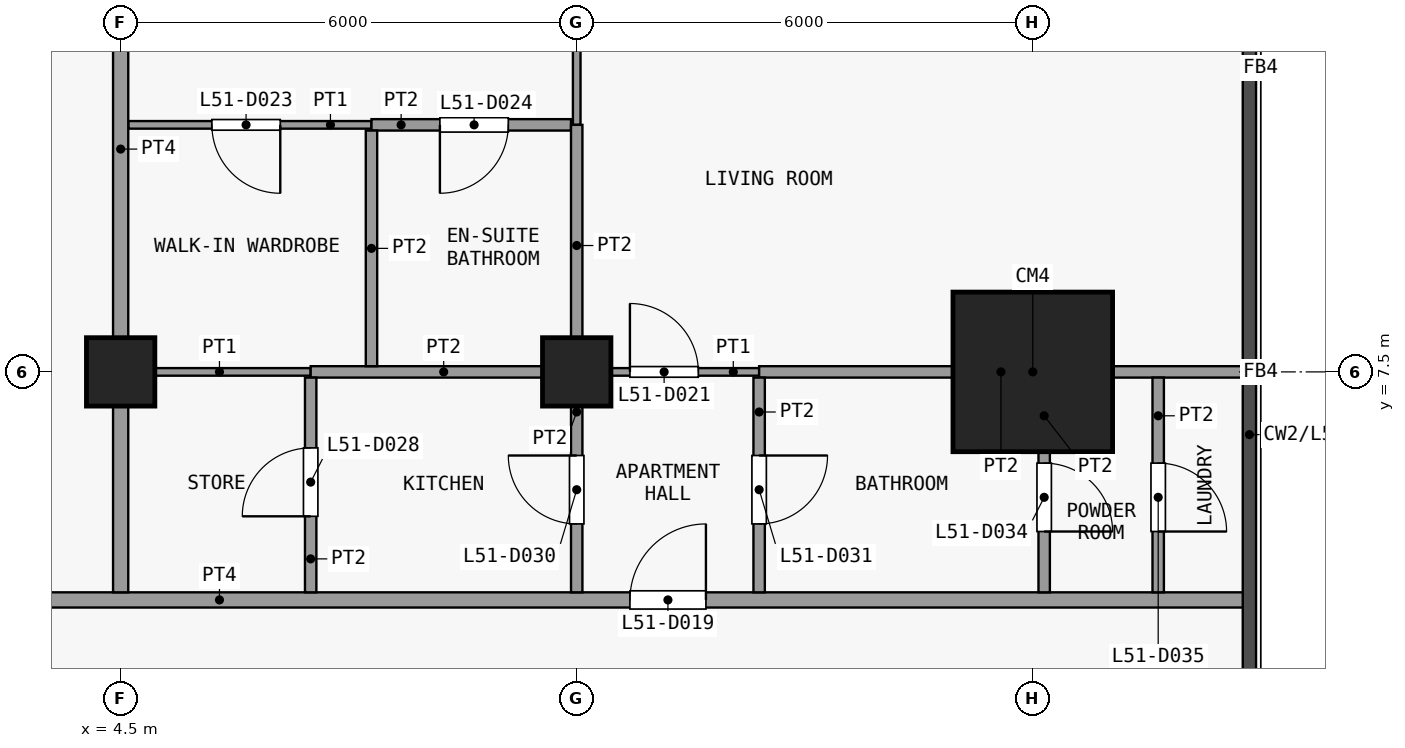
"""IFC4 building model, lengths in metres.
Left out: names, types, materials, properties, quantities, classifications, styles, units other than length and angle.
Written with IfcOpenShell. Run it as: python <this file> out.ifc"""

import sys

from ifc_helpers import new_model, si_unit, direction, frame, frame_2d, origin, origin_2d, place, context, subcontext, project, spatial, rectangle, extrude, element, fill, save


model = new_model("IFC4")
c1 = context("Model", 3, precision=1e-05, world=origin(), true_north=direction((0.0, 1.0)))
c2 = subcontext(c1, "Body", "Model", "MODEL_VIEW")
j1 = project(units=[si_unit("LENGTHUNIT", "METRE"), si_unit("PLANEANGLEUNIT", "RADIAN")], contexts=[c1])
p1 = place(None, origin())
s1 = spatial("IfcSite", under=j1, at=p1, CompositionType="ELEMENT")
p2 = place(p1, origin())
s2 = spatial("IfcBuilding", under=s1, at=p2, CompositionType="ELEMENT")
p3 = place(p2, frame((0.0, 0.0, 205.1)))
s3 = spatial("IfcBuildingStorey", under=s2, at=p3, CompositionType="ELEMENT", Elevation=205.1)
for number, where, z_axis, x_axis in (
    (1, (4.5, 7.5, 0.0), (0.0, 0.0, 1.0), (1.0, 0.0, 0.0)),
    (2, (10.5, 7.5, 0.0), (0.0, 0.0, 1.0), (1.0, 0.0, 0.0)),
):
    element("IfcColumn", number, at=place(p3, frame(where, z_axis=z_axis, x_axis=x_axis)), inside=s3, PredefinedType="COLUMN", context=c2, shape_type="SweptSolid", body=[
        extrude(rectangle(XDim=0.9, YDim=0.9, at=origin_2d()), origin(), (0.0, 0.0, 1.0), 3.6),
    ])
p4 = place(p3, frame((16.5, 7.5, 0.0), z_axis=(0.0, 0.0, 1.0), x_axis=(1.0, 0.0, 0.0)))
e3 = element("IfcColumn", 3, at=p4, inside=s3, PredefinedType="COLUMN", context=c2, shape_type="SweptSolid", body=[
    extrude(rectangle(XDim=2.1, YDim=2.1, at=origin_2d()), origin(), (0.0, 0.0, 1.0), 3.6),
])
p5 = place(p3, frame((-19.35, 4.5, 0.0), z_axis=(0.0, 0.0, 1.0), x_axis=(1.0, 0.0, 0.0)))
e4 = element("IfcWall", 4, at=p5, inside=s3, PredefinedType="PARTITIONING", context=c2, shape_type="SweptSolid", body=[
    extrude(rectangle(XDim=38.7, YDim=0.2, at=frame_2d((19.35, 0.0))), origin(), (0.0, 0.0, 1.0), 3.3),
])
p6 = place(p5, frame((4.55, 0.0, 0.0)))
e5 = element("IfcOpeningElement", 5, at=p6, cuts=e4, PredefinedType="OPENING", context=c2, shape_type="SweptSolid", body=[
    extrude(rectangle(XDim=1.0, YDim=2.1, at=frame_2d((0.5, 1.05))), frame((0.0, 0.11, 0.0), z_axis=(0.0, -1.0, 0.0), x_axis=(1.0, 0.0, 0.0)), (0.0, 0.0, 1.0), 0.22),
])
p7 = place(p5, frame((11.35, 0.0, 0.0)))
e6 = element("IfcOpeningElement", 6, at=p7, cuts=e4, PredefinedType="OPENING", context=c2, shape_type="SweptSolid", body=[
    extrude(rectangle(XDim=0.9, YDim=2.1, at=frame_2d((0.45, 1.05))), frame((0.0, 0.11, 0.0), z_axis=(0.0, -1.0, 0.0), x_axis=(1.0, 0.0, 0.0)), (0.0, 0.0, 1.0), 0.22),
])
p8 = place(p5, frame((18.85, 0.0, 0.0)))
e7 = element("IfcOpeningElement", 7, at=p8, cuts=e4, PredefinedType="OPENING", context=c2, shape_type="SweptSolid", body=[
    extrude(rectangle(XDim=0.9, YDim=2.1, at=frame_2d((0.45, 1.05))), frame((0.0, 0.11, 0.0), z_axis=(0.0, -1.0, 0.0), x_axis=(1.0, 0.0, 0.0)), (0.0, 0.0, 1.0), 0.22),
])
p9 = place(p5, frame((30.55, 0.0, 0.0)))
e8 = element("IfcOpeningElement", 8, at=p9, cuts=e4, PredefinedType="OPENING", context=c2, shape_type="SweptSolid", body=[
    extrude(rectangle(XDim=1.0, YDim=2.1, at=frame_2d((0.5, 1.05))), frame((0.0, 0.11, 0.0), z_axis=(0.0, -1.0, 0.0), x_axis=(1.0, 0.0, 0.0)), (0.0, 0.0, 1.0), 0.22),
])
p10 = place(p3, frame((4.6, 7.5, 0.0), z_axis=(0.0, 0.0, 1.0), x_axis=(1.0, 0.0, 0.0)))
e9 = element("IfcWall", 9, at=p10, inside=s3, PredefinedType="PARTITIONING", context=c2, shape_type="SweptSolid", body=[
    extrude(rectangle(XDim=2.4, YDim=0.1, at=frame_2d((1.2, 0.0))), origin(), (0.0, 0.0, 1.0), 3.3),
])
p11 = place(p3, frame((10.5, 7.5, 0.0), z_axis=(0.0, 0.0, 1.0), x_axis=(1.0, 0.0, 0.0)))
e10 = element("IfcWall", 10, at=p11, inside=s3, PredefinedType="PARTITIONING", context=c2, shape_type="SweptSolid", body=[
    extrude(rectangle(XDim=2.4, YDim=0.1, at=frame_2d((1.2, 0.0))), origin(), (0.0, 0.0, 1.0), 3.3),
])
p12 = place(p11, frame((0.7, 0.0, 0.0)))
e11 = element("IfcOpeningElement", 11, at=p12, cuts=e10, PredefinedType="OPENING", context=c2, shape_type="SweptSolid", body=[
    extrude(rectangle(XDim=0.9, YDim=2.1, at=frame_2d((0.45, 1.05))), frame((0.0, 0.06, 0.0), z_axis=(0.0, -1.0, 0.0), x_axis=(1.0, 0.0, 0.0)), (0.0, 0.0, 1.0), 0.12),
])
p13 = place(p3, frame((7.0, 7.5, 0.0), z_axis=(0.0, 0.0, 1.0), x_axis=(1.0, 0.0, 0.0)))
e12 = element("IfcWall", 12, at=p13, inside=s3, PredefinedType="PARTITIONING", context=c2, shape_type="SweptSolid", body=[
    extrude(rectangle(XDim=3.5, YDim=0.15, at=frame_2d((1.75, 0.0))), origin(), (0.0, 0.0, 1.0), 3.3),
])
p14 = place(p3, frame((12.9, 7.5, 0.0), z_axis=(0.0, 0.0, 1.0), x_axis=(1.0, 0.0, 0.0)))
e13 = element("IfcWall", 13, at=p14, inside=s3, PredefinedType="PARTITIONING", context=c2, shape_type="SweptSolid", body=[
    extrude(rectangle(XDim=6.363, YDim=0.15, at=frame_2d((3.181, 0.0))), origin(), (0.0, 0.0, 1.0), 3.3),
])
p15 = place(p3, frame((4.6, 10.75, 0.0), z_axis=(0.0, 0.0, 1.0), x_axis=(1.0, 0.0, 0.0)))
e14 = element("IfcWall", 14, at=p15, inside=s3, PredefinedType="PARTITIONING", context=c2, shape_type="SweptSolid", body=[
    extrude(rectangle(XDim=3.2, YDim=0.1, at=frame_2d((1.6, 0.0))), origin(), (0.0, 0.0, 1.0), 3.3),
])
p16 = place(p15, frame((1.1, 0.0, 0.0)))
e15 = element("IfcOpeningElement", 15, at=p16, cuts=e14, PredefinedType="OPENING", context=c2, shape_type="SweptSolid", body=[
    extrude(rectangle(XDim=0.9, YDim=2.1, at=frame_2d((0.45, 1.05))), frame((0.0, 0.06, 0.0), z_axis=(0.0, -1.0, 0.0), x_axis=(1.0, 0.0, 0.0)), (0.0, 0.0, 1.0), 0.12),
])
p17 = place(p3, frame((7.8, 10.75, 0.0), z_axis=(0.0, 0.0, 1.0), x_axis=(1.0, 0.0, 0.0)))
e16 = element("IfcWall", 16, at=p17, inside=s3, PredefinedType="PARTITIONING", context=c2, shape_type="SweptSolid", body=[
    extrude(rectangle(XDim=2.625, YDim=0.15, at=frame_2d((1.312, 0.0))), origin(), (0.0, 0.0, 1.0), 3.3),
])
p18 = place(p17, frame((0.9, 0.0, 0.0)))
e17 = element("IfcOpeningElement", 17, at=p18, cuts=e16, PredefinedType="OPENING", context=c2, shape_type="SweptSolid", body=[
    extrude(rectangle(XDim=0.9, YDim=2.1, at=frame_2d((0.45, 1.05))), frame((0.0, 0.085, 0.0), z_axis=(0.0, -1.0, 0.0), x_axis=(1.0, 0.0, 0.0)), (0.0, 0.0, 1.0), 0.17),
])
p19 = place(p3, frame((4.5, 4.6, 0.0), z_axis=(0.0, 0.0, 1.0), x_axis=(0.0, 1.0, 0.0)))
e18 = element("IfcWall", 18, at=p19, inside=s3, PredefinedType="PARTITIONING", context=c2, shape_type="SweptSolid", body=[
    extrude(rectangle(XDim=11.662, YDim=0.2, at=frame_2d((5.831, 0.0))), origin(), (0.0, 0.0, 1.0), 3.3),
])
p20 = place(p3, frame((7.0, 4.6, 0.0), z_axis=(0.0, 0.0, 1.0), x_axis=(0.0, 1.0, 0.0)))
e19 = element("IfcWall", 19, at=p20, inside=s3, PredefinedType="PARTITIONING", context=c2, shape_type="SweptSolid", body=[
    extrude(rectangle(XDim=2.825, YDim=0.15, at=frame_2d((1.413, 0.0))), origin(), (0.0, 0.0, 1.0), 3.3),
])
p21 = place(p20, frame((1.0, 0.0, 0.0)))
e20 = element("IfcOpeningElement", 20, at=p21, cuts=e19, PredefinedType="OPENING", context=c2, shape_type="SweptSolid", body=[
    extrude(rectangle(XDim=0.9, YDim=2.1, at=frame_2d((0.45, 1.05))), frame((0.0, 0.085, 0.0), z_axis=(0.0, -1.0, 0.0), x_axis=(1.0, 0.0, 0.0)), (0.0, 0.0, 1.0), 0.17),
])
p22 = place(p3, frame((7.8, 7.575, 0.0), z_axis=(0.0, 0.0, 1.0), x_axis=(0.0, 1.0, 0.0)))
e21 = element("IfcWall", 21, at=p22, inside=s3, PredefinedType="PARTITIONING", context=c2, shape_type="SweptSolid", body=[
    extrude(rectangle(XDim=3.1, YDim=0.15, at=frame_2d((1.55, 0.0))), origin(), (0.0, 0.0, 1.0), 3.3),
])
p23 = place(p3, frame((10.5, 10.75, 0.0), z_axis=(0.0, 0.0, 1.0), x_axis=(0.0, 1.0, 0.0)))
e22 = element("IfcWall", 22, at=p23, inside=s3, PredefinedType="PARTITIONING", context=c2, shape_type="SweptSolid", body=[
    extrude(rectangle(XDim=5.512, YDim=0.1, at=frame_2d((2.756, 0.0))), origin(), (0.0, 0.0, 1.0), 3.3),
])
p24 = place(p23, frame((3.3, 0.0, 0.0)))
e23 = element("IfcOpeningElement", 23, at=p24, cuts=e22, PredefinedType="OPENING", context=c2, shape_type="SweptSolid", body=[
    extrude(rectangle(XDim=0.9, YDim=2.1, at=frame_2d((0.45, 1.05))), frame((0.0, 0.06, 0.0), z_axis=(0.0, -1.0, 0.0), x_axis=(1.0, 0.0, 0.0)), (0.0, 0.0, 1.0), 0.12),
])
p25 = place(p3, frame((10.5, 4.6, 0.0), z_axis=(0.0, 0.0, 1.0), x_axis=(0.0, 1.0, 0.0)))
e24 = element("IfcWall", 24, at=p25, inside=s3, PredefinedType="PARTITIONING", context=c2, shape_type="SweptSolid", body=[
    extrude(rectangle(XDim=2.825, YDim=0.15, at=frame_2d((1.413, 0.0))), origin(), (0.0, 0.0, 1.0), 3.3),
])
p26 = place(p25, frame((0.9, 0.0, 0.0)))
e25 = element("IfcOpeningElement", 25, at=p26, cuts=e24, PredefinedType="OPENING", context=c2, shape_type="SweptSolid", body=[
    extrude(rectangle(XDim=0.9, YDim=2.1, at=frame_2d((0.45, 1.05))), frame((0.0, 0.085, 0.0), z_axis=(0.0, -1.0, 0.0), x_axis=(1.0, 0.0, 0.0)), (0.0, 0.0, 1.0), 0.17),
])
p27 = place(p3, frame((10.5, 7.575, 0.0), z_axis=(0.0, 0.0, 1.0), x_axis=(0.0, 1.0, 0.0)))
e26 = element("IfcWall", 26, at=p27, inside=s3, PredefinedType="PARTITIONING", context=c2, shape_type="SweptSolid", body=[
    extrude(rectangle(XDim=3.175, YDim=0.15, at=frame_2d((1.587, 0.0))), origin(), (0.0, 0.0, 1.0), 3.3),
])
p28 = place(p3, frame((12.9, 4.6, 0.0), z_axis=(0.0, 0.0, 1.0), x_axis=(0.0, 1.0, 0.0)))
e27 = element("IfcWall", 27, at=p28, inside=s3, PredefinedType="PARTITIONING", context=c2, shape_type="SweptSolid", body=[
    extrude(rectangle(XDim=2.825, YDim=0.15, at=frame_2d((1.413, 0.0))), origin(), (0.0, 0.0, 1.0), 3.3),
])
p29 = place(p28, frame((0.9, 0.0, 0.0)))
e28 = element("IfcOpeningElement", 28, at=p29, cuts=e27, PredefinedType="OPENING", context=c2, shape_type="SweptSolid", body=[
    extrude(rectangle(XDim=0.9, YDim=2.1, at=frame_2d((0.45, 1.05))), frame((0.0, 0.085, 0.0), z_axis=(0.0, -1.0, 0.0), x_axis=(1.0, 0.0, 0.0)), (0.0, 0.0, 1.0), 0.17),
])
p30 = place(p3, frame((16.65, 4.6, 0.0), z_axis=(0.0, 0.0, 1.0), x_axis=(0.0, 1.0, 0.0)))
e29 = element("IfcWall", 29, at=p30, inside=s3, PredefinedType="PARTITIONING", context=c2, shape_type="SweptSolid", body=[
    extrude(rectangle(XDim=2.825, YDim=0.15, at=frame_2d((1.413, 0.0))), origin(), (0.0, 0.0, 1.0), 3.3),
])
p31 = place(p30, frame((0.8, 0.0, 0.0)))
e30 = element("IfcOpeningElement", 30, at=p31, cuts=e29, PredefinedType="OPENING", context=c2, shape_type="SweptSolid", body=[
    extrude(rectangle(XDim=0.9, YDim=2.1, at=frame_2d((0.45, 1.05))), frame((0.0, 0.085, 0.0), z_axis=(0.0, -1.0, 0.0), x_axis=(1.0, 0.0, 0.0)), (0.0, 0.0, 1.0), 0.17),
])
p32 = place(p3, frame((18.15, 4.6, 0.0), z_axis=(0.0, 0.0, 1.0), x_axis=(0.0, 1.0, 0.0)))
e31 = element("IfcWall", 31, at=p32, inside=s3, PredefinedType="PARTITIONING", context=c2, shape_type="SweptSolid", body=[
    extrude(rectangle(XDim=2.825, YDim=0.15, at=frame_2d((1.413, 0.0))), origin(), (0.0, 0.0, 1.0), 3.3),
])
p33 = place(p32, frame((0.8, 0.0, 0.0)))
e32 = element("IfcOpeningElement", 32, at=p33, cuts=e31, PredefinedType="OPENING", context=c2, shape_type="SweptSolid", body=[
    extrude(rectangle(XDim=0.9, YDim=2.1, at=frame_2d((0.45, 1.05))), frame((0.0, 0.085, 0.0), z_axis=(0.0, -1.0, 0.0), x_axis=(1.0, 0.0, 0.0)), (0.0, 0.0, 1.0), 0.17),
])
p34 = place(p9, origin())
e33 = element("IfcDoor", 33, at=p34, inside=s3, OperationType="SINGLE_SWING_LEFT", PredefinedType="DOOR", context=c2, shape_type="SweptSolid", body=[
    extrude(rectangle(XDim=1.0, YDim=2.1, at=frame_2d((0.5, 1.05))), frame((0.0, 0.025, 0.0), z_axis=(0.0, -1.0, 0.0), x_axis=(1.0, 0.0, 0.0)), (0.0, 0.0, 1.0), 0.05),
])
fill(e8, e33)
p35 = place(p12, origin())
e34 = element("IfcDoor", 34, at=p35, inside=s3, OperationType="SINGLE_SWING_RIGHT", PredefinedType="DOOR", context=c2, shape_type="SweptSolid", body=[
    extrude(rectangle(XDim=0.9, YDim=2.1, at=frame_2d((0.45, 1.05))), frame((0.0, 0.025, 0.0), z_axis=(0.0, -1.0, 0.0), x_axis=(1.0, 0.0, 0.0)), (0.0, 0.0, 1.0), 0.05),
])
fill(e11, e34)
p36 = place(p16, origin())
e35 = element("IfcDoor", 35, at=p36, inside=s3, OperationType="SINGLE_SWING_RIGHT", PredefinedType="DOOR", context=c2, shape_type="SweptSolid", body=[
    extrude(rectangle(XDim=0.9, YDim=2.1, at=frame_2d((0.45, 1.05))), frame((0.0, 0.025, 0.0), z_axis=(0.0, -1.0, 0.0), x_axis=(1.0, 0.0, 0.0)), (0.0, 0.0, 1.0), 0.05),
])
fill(e15, e35)
p37 = place(p18, origin())
e36 = element("IfcDoor", 36, at=p37, inside=s3, OperationType="SINGLE_SWING_LEFT", PredefinedType="DOOR", context=c2, shape_type="SweptSolid", body=[
    extrude(rectangle(XDim=0.9, YDim=2.1, at=frame_2d((0.45, 1.05))), frame((0.0, 0.025, 0.0), z_axis=(0.0, -1.0, 0.0), x_axis=(1.0, 0.0, 0.0)), (0.0, 0.0, 1.0), 0.05),
])
fill(e17, e36)
p38 = place(p21, origin())
e37 = element("IfcDoor", 37, at=p38, inside=s3, OperationType="SINGLE_SWING_RIGHT", PredefinedType="DOOR", context=c2, shape_type="SweptSolid", body=[
    extrude(rectangle(XDim=0.9, YDim=2.1, at=frame_2d((0.45, 1.05))), frame((0.0, 0.025, 0.0), z_axis=(0.0, -1.0, 0.0), x_axis=(1.0, 0.0, 0.0)), (0.0, 0.0, 1.0), 0.05),
])
fill(e20, e37)
p39 = place(p26, origin())
e38 = element("IfcDoor", 38, at=p39, inside=s3, OperationType="SINGLE_SWING_LEFT", PredefinedType="DOOR", context=c2, shape_type="SweptSolid", body=[
    extrude(rectangle(XDim=0.9, YDim=2.1, at=frame_2d((0.45, 1.05))), frame((0.0, 0.025, 0.0), z_axis=(0.0, -1.0, 0.0), x_axis=(1.0, 0.0, 0.0)), (0.0, 0.0, 1.0), 0.05),
])
fill(e25, e38)
p40 = place(p29, origin())
e39 = element("IfcDoor", 39, at=p40, inside=s3, OperationType="SINGLE_SWING_RIGHT", PredefinedType="DOOR", context=c2, shape_type="SweptSolid", body=[
    extrude(rectangle(XDim=0.9, YDim=2.1, at=frame_2d((0.45, 1.05))), frame((0.0, 0.025, 0.0), z_axis=(0.0, -1.0, 0.0), x_axis=(1.0, 0.0, 0.0)), (0.0, 0.0, 1.0), 0.05),
])
fill(e28, e39)
p41 = place(p31, origin())
e40 = element("IfcDoor", 40, at=p41, inside=s3, OperationType="SINGLE_SWING_LEFT", PredefinedType="DOOR", context=c2, shape_type="SweptSolid", body=[
    extrude(rectangle(XDim=0.9, YDim=2.1, at=frame_2d((0.45, 1.05))), frame((0.0, 0.025, 0.0), z_axis=(0.0, -1.0, 0.0), x_axis=(1.0, 0.0, 0.0)), (0.0, 0.0, 1.0), 0.05),
])
fill(e30, e40)
p42 = place(p33, origin())
e41 = element("IfcDoor", 41, at=p42, inside=s3, OperationType="SINGLE_SWING_LEFT", PredefinedType="DOOR", context=c2, shape_type="SweptSolid", body=[
    extrude(rectangle(XDim=0.9, YDim=2.1, at=frame_2d((0.45, 1.05))), frame((0.0, 0.025, 0.0), z_axis=(0.0, -1.0, 0.0), x_axis=(1.0, 0.0, 0.0)), (0.0, 0.0, 1.0), 0.05),
])
fill(e32, e41)
save(model, sys.argv[1])
